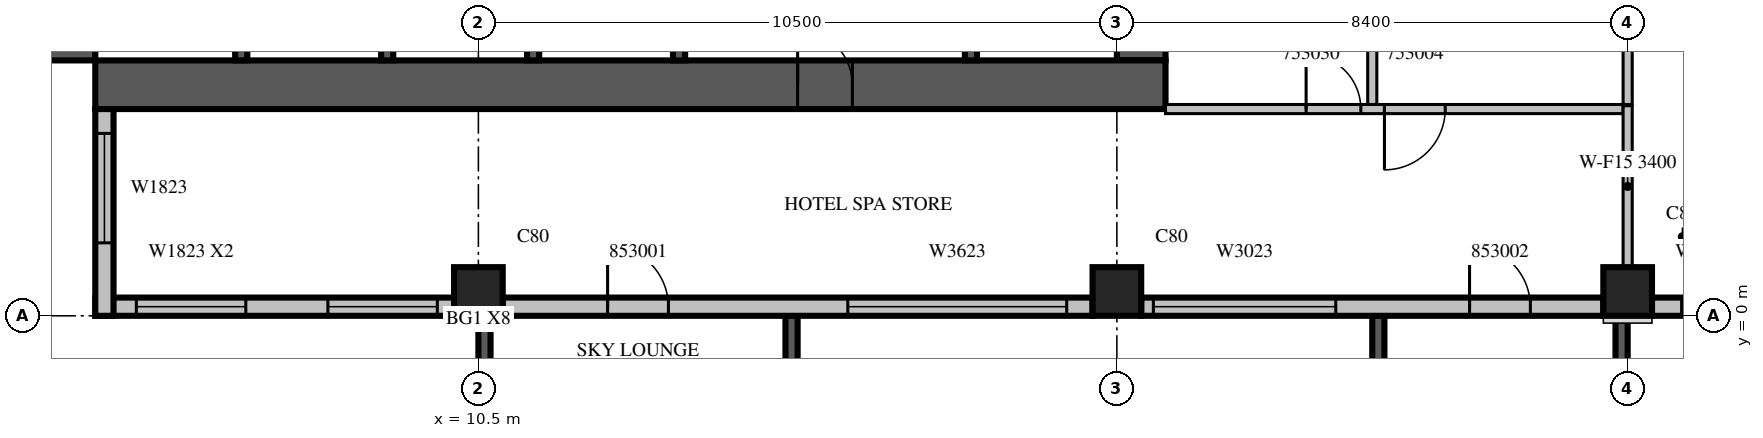
"""IFC4 building model, lengths in metres.
Left out: names, types, materials, properties, quantities, classifications, styles, units other than length and angle.
Written with IfcOpenShell. Run it as: python <this file> out.ifc"""

import sys

from ifc_helpers import new_model, si_unit, direction, frame, frame_2d, origin, origin_2d, place, context, subcontext, project, spatial, rectangle, extrude, source, transform, mapped, element, fill, save


model = new_model("IFC4")
c1 = context("Model", 3, precision=1e-05, world=origin(), true_north=direction((0.0, 1.0)))
c2 = subcontext(c1, "Body", "Model", "MODEL_VIEW")
j1 = project(units=[si_unit("LENGTHUNIT", "METRE"), si_unit("PLANEANGLEUNIT", "RADIAN")], contexts=[c1])
p1 = place(None, origin())
s1 = spatial("IfcSite", under=j1, at=p1, CompositionType="ELEMENT")
p2 = place(p1, origin())
s2 = spatial("IfcBuilding", under=s1, at=p2, CompositionType="ELEMENT")
p3 = place(p2, frame((0.0, 0.0, 234.8)))
s3 = spatial("IfcBuildingStorey", under=s2, at=p3, CompositionType="ELEMENT", Elevation=234.8)
m1 = source(origin(), c2, "Body", "SweptSolid", [
    extrude(rectangle(XDim=0.8, YDim=0.8, at=origin_2d()), origin(), (0.0, 0.0, 1.0), 3.8),
])
for number, where, z_axis, x_axis in (
    (1, (10.5, 0.4, 0.0), (0.0, 0.0, 1.0), (1.0, 0.0, 0.0)),
    (2, (21.0, 0.4, 0.0), (0.0, 0.0, 1.0), (1.0, 0.0, 0.0)),
    (3, (29.4, 0.4, 0.0), (0.0, 0.0, 1.0), (1.0, 0.0, 0.0)),
):
    element("IfcColumn", number, at=place(p3, frame(where, z_axis=z_axis, x_axis=x_axis)), inside=s3, PredefinedType="COLUMN", context=c2, shape_type="MappedRepresentation", body=[
        mapped(m1, transform((0.0, 0.0, 0.0), scale=1.0)),
    ])
m2 = source(origin(), c2, "Body", "SweptSolid", [
    extrude(rectangle(XDim=17.6, YDim=0.8, at=frame_2d((8.8, 0.0))), origin(), (0.0, 0.0, 1.0), 3.8),
])
p4 = place(p3, frame((3.8, 4.2, 0.0), z_axis=(0.0, 0.0, 1.0), x_axis=(0.0, 1.0, 0.0)))
e4 = element("IfcWall", 4, at=p4, inside=s3, PredefinedType="SHEAR", context=c2, shape_type="MappedRepresentation", body=[
    mapped(m2, transform((0.0, 0.0, 0.0), scale=1.0)),
])
m3 = source(origin(), c2, "Body", "SweptSolid", [
    extrude(rectangle(XDim=2.2, YDim=2.1, at=frame_2d((1.1, 1.05))), frame((0.0, 0.41, 0.0), z_axis=(0.0, -1.0, 0.0), x_axis=(1.0, 0.0, 0.0)), (0.0, 0.0, 1.0), 0.82),
])
p5 = place(p4, frame((4.2, 0.0, 0.0)))
e5 = element("IfcOpeningElement", 5, at=p5, cuts=e4, PredefinedType="OPENING", context=c2, shape_type="MappedRepresentation", body=[
    mapped(m3, transform((0.0, 0.0, 0.0), scale=1.0)),
])
m4 = source(origin(), c2, "Body", "SweptSolid", [
    extrude(rectangle(XDim=0.9, YDim=2.1, at=frame_2d((0.45, 1.05))), frame((0.0, 0.41, 0.0), z_axis=(0.0, -1.0, 0.0), x_axis=(1.0, 0.0, 0.0)), (0.0, 0.0, 1.0), 0.82),
])
p6 = place(p4, frame((10.95, 0.0, 0.0)))
e6 = element("IfcOpeningElement", 6, at=p6, cuts=e4, PredefinedType="OPENING", context=c2, shape_type="MappedRepresentation", body=[
    mapped(m4, transform((0.0, 0.0, 0.0), scale=1.0)),
])
m5 = source(origin(), c2, "Body", "SweptSolid", [
    extrude(rectangle(XDim=16.8, YDim=0.8, at=frame_2d((8.4, 0.0))), origin(), (0.0, 0.0, 1.0), 3.8),
])
p7 = place(p3, frame((21.4, 4.2, 0.0), z_axis=(0.0, 0.0, 1.0), x_axis=(0.0, 1.0, 0.0)))
e7 = element("IfcWall", 7, at=p7, inside=s3, PredefinedType="SHEAR", context=c2, shape_type="MappedRepresentation", body=[
    mapped(m5, transform((0.0, 0.0, 0.0), scale=1.0)),
])
p8 = place(p7, frame((4.2, 0.0, 0.0)))
e8 = element("IfcOpeningElement", 8, at=p8, cuts=e7, PredefinedType="OPENING", context=c2, shape_type="MappedRepresentation", body=[
    mapped(m3, transform((0.0, 0.0, 0.0), scale=1.0)),
])
m6 = source(origin(), c2, "Body", "SweptSolid", [
    extrude(rectangle(XDim=1.2, YDim=2.1, at=frame_2d((0.6, 1.05))), frame((0.0, 0.41, 0.0), z_axis=(0.0, -1.0, 0.0), x_axis=(1.0, 0.0, 0.0)), (0.0, 0.0, 1.0), 0.82),
])
p9 = place(p7, frame((14.7, 0.0, 0.0)))
e9 = element("IfcOpeningElement", 9, at=p9, cuts=e7, PredefinedType="OPENING", context=c2, shape_type="MappedRepresentation", body=[
    mapped(m6, transform((0.0, 0.0, 0.0), scale=1.0)),
])
p10 = place(p3, frame((4.2, 3.8, 0.0), z_axis=(0.0, 0.0, 1.0), x_axis=(1.0, 0.0, 0.0)))
e10 = element("IfcWall", 10, at=p10, inside=s3, PredefinedType="SHEAR", context=c2, shape_type="MappedRepresentation", body=[
    mapped(m2, transform((0.0, 0.0, 0.0), scale=1.0)),
])
p11 = place(p10, frame((11.55, 0.0, 0.0)))
e11 = element("IfcOpeningElement", 11, at=p11, cuts=e10, PredefinedType="OPENING", context=c2, shape_type="MappedRepresentation", body=[
    mapped(m4, transform((0.0, 0.0, 0.0), scale=1.0)),
])
m7 = source(origin(), c2, "Body", "SweptSolid", [
    extrude(rectangle(XDim=3.9, YDim=0.2, at=frame_2d((1.95, 0.0))), origin(), (0.0, 0.0, 1.0), 3.4),
])
p12 = place(p3, frame((10.6, 0.0, 0.0), z_axis=(0.0, 0.0, 1.0), x_axis=(0.0, -1.0, 0.0)))
e12 = element("IfcWall", 12, at=p12, inside=s3, PredefinedType="SOLIDWALL", context=c2, shape_type="MappedRepresentation", body=[
    mapped(m7, transform((0.0, 0.0, 0.0), scale=1.0)),
])
m8 = source(origin(), c2, "Body", "SweptSolid", [
    extrude(rectangle(XDim=2.4, YDim=2.3, at=frame_2d((1.2, 1.15))), frame((0.0, 0.11, 0.0), z_axis=(0.0, -1.0, 0.0), x_axis=(1.0, 0.0, 0.0)), (0.0, 0.0, 1.0), 0.22),
])
p13 = place(p12, frame((0.75, 0.0, 0.6)))
e13 = element("IfcOpeningElement", 13, at=p13, cuts=e12, PredefinedType="OPENING", context=c2, shape_type="MappedRepresentation", body=[
    mapped(m8, transform((0.0, 0.0, 0.0), scale=1.0)),
])
p14 = place(p3, frame((15.65, 0.0, 0.0), z_axis=(0.0, 0.0, 1.0), x_axis=(0.0, -1.0, 0.0)))
e14 = element("IfcWall", 14, at=p14, inside=s3, PredefinedType="SOLIDWALL", context=c2, shape_type="MappedRepresentation", body=[
    mapped(m7, transform((0.0, 0.0, 0.0), scale=1.0)),
])
p15 = place(p14, frame((0.75, 0.0, 0.6)))
e15 = element("IfcOpeningElement", 15, at=p15, cuts=e14, PredefinedType="OPENING", context=c2, shape_type="MappedRepresentation", body=[
    mapped(m8, transform((0.0, 0.0, 0.0), scale=1.0)),
])
p16 = place(p3, frame((25.3, 0.0, 0.0), z_axis=(0.0, 0.0, 1.0), x_axis=(0.0, -1.0, 0.0)))
e16 = element("IfcWall", 16, at=p16, inside=s3, PredefinedType="SOLIDWALL", context=c2, shape_type="MappedRepresentation", body=[
    mapped(m7, transform((0.0, 0.0, 0.0), scale=1.0)),
])
p17 = place(p16, frame((0.75, 0.0, 0.6)))
e17 = element("IfcOpeningElement", 17, at=p17, cuts=e16, PredefinedType="OPENING", context=c2, shape_type="MappedRepresentation", body=[
    mapped(m8, transform((0.0, 0.0, 0.0), scale=1.0)),
])
p18 = place(p3, frame((29.3, 0.0, 0.0), z_axis=(0.0, 0.0, 1.0), x_axis=(0.0, -1.0, 0.0)))
e18 = element("IfcWall", 18, at=p18, inside=s3, PredefinedType="SOLIDWALL", context=c2, shape_type="MappedRepresentation", body=[
    mapped(m7, transform((0.0, 0.0, 0.0), scale=1.0)),
])
p19 = place(p18, frame((0.75, 0.0, 0.6)))
e19 = element("IfcOpeningElement", 19, at=p19, cuts=e18, PredefinedType="OPENING", context=c2, shape_type="MappedRepresentation", body=[
    mapped(m8, transform((0.0, 0.0, 0.0), scale=1.0)),
])
m9 = source(origin(), c2, "Body", "SweptSolid", [
    extrude(rectangle(XDim=5.9, YDim=0.3, at=frame_2d((2.95, 0.0))), origin(), (0.0, 0.0, 1.0), 3.4),
])
p20 = place(p3, frame((4.2, 0.15, 0.0), z_axis=(0.0, 0.0, 1.0), x_axis=(1.0, 0.0, 0.0)))
e20 = element("IfcWall", 20, at=p20, inside=s3, PredefinedType="STANDARD", context=c2, shape_type="MappedRepresentation", body=[
    mapped(m9, transform((0.0, 0.0, 0.0), scale=1.0)),
])
m10 = source(origin(), c2, "Body", "SweptSolid", [
    extrude(rectangle(XDim=1.8, YDim=2.3, at=frame_2d((0.9, 1.15))), frame((0.0, 0.16, 0.0), z_axis=(0.0, -1.0, 0.0), x_axis=(1.0, 0.0, 0.0)), (0.0, 0.0, 1.0), 0.32),
])
p21 = place(p20, frame((0.675, 0.0, 0.6)))
e21 = element("IfcOpeningElement", 21, at=p21, cuts=e20, PredefinedType="OPENING", context=c2, shape_type="MappedRepresentation", body=[
    mapped(m10, transform((0.0, 0.0, 0.0), scale=1.0)),
])
p22 = place(p20, frame((3.825, 0.0, 0.6)))
e22 = element("IfcOpeningElement", 22, at=p22, cuts=e20, PredefinedType="OPENING", context=c2, shape_type="MappedRepresentation", body=[
    mapped(m10, transform((0.0, 0.0, 0.0), scale=1.0)),
])
m11 = source(origin(), c2, "Body", "SweptSolid", [
    extrude(rectangle(XDim=9.7, YDim=0.3, at=frame_2d((4.85, 0.0))), origin(), (0.0, 0.0, 1.0), 3.4),
])
p23 = place(p3, frame((10.9, 0.15, 0.0), z_axis=(0.0, 0.0, 1.0), x_axis=(1.0, 0.0, 0.0)))
e23 = element("IfcWall", 23, at=p23, inside=s3, PredefinedType="STANDARD", context=c2, shape_type="MappedRepresentation", body=[
    mapped(m11, transform((0.0, 0.0, 0.0), scale=1.0)),
])
m12 = source(origin(), c2, "Body", "SweptSolid", [
    extrude(rectangle(XDim=3.6, YDim=2.3, at=frame_2d((1.8, 1.15))), frame((0.0, 0.16, 0.0), z_axis=(0.0, -1.0, 0.0), x_axis=(1.0, 0.0, 0.0)), (0.0, 0.0, 1.0), 0.32),
])
p24 = place(p23, frame((5.675, 0.0, 0.6)))
e24 = element("IfcOpeningElement", 24, at=p24, cuts=e23, PredefinedType="OPENING", context=c2, shape_type="MappedRepresentation", body=[
    mapped(m12, transform((0.0, 0.0, 0.0), scale=1.0)),
])
m13 = source(origin(), c2, "Body", "SweptSolid", [
    extrude(rectangle(XDim=1.0, YDim=2.1, at=frame_2d((0.5, 1.05))), frame((0.0, 0.16, 0.0), z_axis=(0.0, -1.0, 0.0), x_axis=(1.0, 0.0, 0.0)), (0.0, 0.0, 1.0), 0.32),
])
p25 = place(p23, frame((1.725, 0.0, 0.0)))
e25 = element("IfcOpeningElement", 25, at=p25, cuts=e23, PredefinedType="OPENING", context=c2, shape_type="MappedRepresentation", body=[
    mapped(m13, transform((0.0, 0.0, 0.0), scale=1.0)),
])
m14 = source(origin(), c2, "Body", "SweptSolid", [
    extrude(rectangle(XDim=7.6, YDim=0.3, at=frame_2d((3.8, 0.0))), origin(), (0.0, 0.0, 1.0), 3.4),
])
p26 = place(p3, frame((21.4, 0.15, 0.0), z_axis=(0.0, 0.0, 1.0), x_axis=(1.0, 0.0, 0.0)))
e26 = element("IfcWall", 26, at=p26, inside=s3, PredefinedType="STANDARD", context=c2, shape_type="MappedRepresentation", body=[
    mapped(m14, transform((0.0, 0.0, 0.0), scale=1.0)),
])
m15 = source(origin(), c2, "Body", "SweptSolid", [
    extrude(rectangle(XDim=3.0, YDim=2.3, at=frame_2d((1.5, 1.15))), frame((0.0, 0.16, 0.0), z_axis=(0.0, -1.0, 0.0), x_axis=(1.0, 0.0, 0.0)), (0.0, 0.0, 1.0), 0.32),
])
p27 = place(p26, frame((0.2, 0.0, 0.6)))
e27 = element("IfcOpeningElement", 27, at=p27, cuts=e26, PredefinedType="OPENING", context=c2, shape_type="MappedRepresentation", body=[
    mapped(m15, transform((0.0, 0.0, 0.0), scale=1.0)),
])
p28 = place(p26, frame((5.4, 0.0, 0.0)))
e28 = element("IfcOpeningElement", 28, at=p28, cuts=e26, PredefinedType="OPENING", context=c2, shape_type="MappedRepresentation", body=[
    mapped(m13, transform((0.0, 0.0, 0.0), scale=1.0)),
])
p29 = place(p3, frame((29.8, 0.15, 0.0), z_axis=(0.0, 0.0, 1.0), x_axis=(1.0, 0.0, 0.0)))
e29 = element("IfcWall", 29, at=p29, inside=s3, PredefinedType="STANDARD", context=c2, shape_type="MappedRepresentation", body=[
    mapped(m14, transform((0.0, 0.0, 0.0), scale=1.0)),
])
m16 = source(origin(), c2, "Body", "SweptSolid", [
    extrude(rectangle(XDim=1.2, YDim=2.3, at=frame_2d((0.6, 1.15))), frame((0.0, 0.16, 0.0), z_axis=(0.0, -1.0, 0.0), x_axis=(1.0, 0.0, 0.0)), (0.0, 0.0, 1.0), 0.32),
])
p30 = place(p29, frame((0.487, 0.0, 0.6)))
e30 = element("IfcOpeningElement", 30, at=p30, cuts=e29, PredefinedType="OPENING", context=c2, shape_type="MappedRepresentation", body=[
    mapped(m16, transform((0.0, 0.0, 0.0), scale=1.0)),
])
p31 = place(p29, frame((6.013, 0.0, 0.6)))
e31 = element("IfcOpeningElement", 31, at=p31, cuts=e29, PredefinedType="OPENING", context=c2, shape_type="MappedRepresentation", body=[
    mapped(m16, transform((0.0, 0.0, 0.0), scale=1.0)),
])
m17 = source(origin(), c2, "Body", "SweptSolid", [
    extrude(rectangle(XDim=2.4, YDim=2.3, at=frame_2d((1.2, 1.15))), frame((0.0, 0.16, 0.0), z_axis=(0.0, -1.0, 0.0), x_axis=(1.0, 0.0, 0.0)), (0.0, 0.0, 1.0), 0.32),
])
p32 = place(p29, frame((2.65, 0.0, 0.6)))
e32 = element("IfcOpeningElement", 32, at=p32, cuts=e29, PredefinedType="OPENING", context=c2, shape_type="MappedRepresentation", body=[
    mapped(m17, transform((0.0, 0.0, 0.0), scale=1.0)),
])
m18 = source(origin(), c2, "Body", "SweptSolid", [
    extrude(rectangle(XDim=3.4, YDim=0.3, at=frame_2d((1.7, 0.0))), origin(), (0.0, 0.0, 1.0), 3.4),
])
p33 = place(p3, frame((4.35, 3.4, 0.0), z_axis=(0.0, 0.0, 1.0), x_axis=(0.0, -1.0, 0.0)))
e33 = element("IfcWall", 33, at=p33, inside=s3, PredefinedType="STANDARD", context=c2, shape_type="MappedRepresentation", body=[
    mapped(m18, transform((0.0, 0.0, 0.0), scale=1.0)),
])
p34 = place(p33, frame((0.4, 0.0, 0.6)))
e34 = element("IfcOpeningElement", 34, at=p34, cuts=e33, PredefinedType="OPENING", context=c2, shape_type="MappedRepresentation", body=[
    mapped(m10, transform((0.0, 0.0, 0.0), scale=1.0)),
])
m19 = source(origin(), c2, "Body", "SweptSolid", [
    extrude(rectangle(XDim=3.1, YDim=0.2, at=frame_2d((1.55, 0.0))), origin(), (0.0, 0.0, 1.0), 3.8),
])
for number, where, z_axis, x_axis in (
    (35, (6.6, 4.2, 0.0), (0.0, 0.0, 1.0), (0.0, 1.0, 0.0)),
    (36, (9.0, 4.2, 0.0), (0.0, 0.0, 1.0), (0.0, 1.0, 0.0)),
    (37, (11.4, 4.2, 0.0), (0.0, 0.0, 1.0), (0.0, 1.0, 0.0)),
):
    element("IfcWall", number, at=place(p3, frame(where, z_axis=z_axis, x_axis=x_axis)), inside=s3, PredefinedType="SOLIDWALL", context=c2, shape_type="MappedRepresentation", body=[
        mapped(m19, transform((0.0, 0.0, 0.0), scale=1.0)),
    ])
m20 = source(origin(), c2, "Body", "SweptSolid", [
    extrude(rectangle(XDim=3.1, YDim=0.2, at=frame_2d((1.55, 0.0))), origin(), (0.0, 0.0, 1.0), 3.4),
])
for number, where, z_axis, x_axis in (
    (38, (13.8, 4.2, 0.0), (0.0, 0.0, 1.0), (0.0, 1.0, 0.0)),
    (39, (18.6, 4.2, 0.0), (0.0, 0.0, 1.0), (0.0, 1.0, 0.0)),
):
    element("IfcWall", number, at=place(p3, frame(where, z_axis=z_axis, x_axis=x_axis)), inside=s3, PredefinedType="SOLIDWALL", context=c2, shape_type="MappedRepresentation", body=[
        mapped(m20, transform((0.0, 0.0, 0.0), scale=1.0)),
    ])
m21 = source(origin(), c2, "Body", "SweptSolid", [
    extrude(rectangle(XDim=11.525, YDim=0.15, at=frame_2d((5.763, 0.0))), origin(), (0.0, 0.0, 1.0), 3.4),
])
p35 = place(p3, frame((25.2, 15.0, 0.0), z_axis=(0.0, 0.0, 1.0), x_axis=(0.0, -1.0, 0.0)))
e40 = element("IfcWall", 40, at=p35, inside=s3, PredefinedType="PARTITIONING", context=c2, shape_type="MappedRepresentation", body=[
    mapped(m21, transform((0.0, 0.0, 0.0), scale=1.0)),
])
m22 = source(origin(), c2, "Body", "SweptSolid", [
    extrude(rectangle(XDim=0.9, YDim=2.1, at=frame_2d((0.45, 1.05))), frame((0.0, 0.085, 0.0), z_axis=(0.0, -1.0, 0.0), x_axis=(1.0, 0.0, 0.0)), (0.0, 0.0, 1.0), 0.17),
])
p36 = place(p35, frame((8.762, 0.0, 0.0)))
e41 = element("IfcOpeningElement", 41, at=p36, cuts=e40, PredefinedType="OPENING", context=c2, shape_type="MappedRepresentation", body=[
    mapped(m22, transform((0.0, 0.0, 0.0), scale=1.0)),
])
p37 = place(p35, frame((2.125, 0.0, 0.0)))
e42 = element("IfcOpeningElement", 42, at=p37, cuts=e40, PredefinedType="OPENING", context=c2, shape_type="MappedRepresentation", body=[
    mapped(m22, transform((0.0, 0.0, 0.0), scale=1.0)),
])
m23 = source(origin(), c2, "Body", "SweptSolid", [
    extrude(rectangle(XDim=6.626, YDim=0.15, at=frame_2d((3.313, 0.0))), origin(), (0.0, 0.0, 1.0), 3.4),
])
p38 = place(p3, frame((29.4, 3.475, 0.0), z_axis=(0.0, 0.0, 1.0), x_axis=(0.0, 1.0, 0.0)))
e43 = element("IfcWall", 43, at=p38, inside=s3, PredefinedType="PARTITIONING", context=c2, shape_type="MappedRepresentation", body=[
    mapped(m23, transform((0.0, 0.0, 0.0), scale=1.0)),
])
m24 = source(origin(), c2, "Body", "SweptSolid", [
    extrude(rectangle(XDim=7.525, YDim=0.15, at=frame_2d((3.763, 0.0))), origin(), (0.0, 0.0, 1.0), 3.4),
])
p39 = place(p3, frame((21.8, 3.4, 0.0), z_axis=(0.0, 0.0, 1.0), x_axis=(1.0, 0.0, 0.0)))
e44 = element("IfcWall", 44, at=p39, inside=s3, PredefinedType="PARTITIONING", context=c2, shape_type="MappedRepresentation", body=[
    mapped(m24, transform((0.0, 0.0, 0.0), scale=1.0)),
])
m25 = source(origin(), c2, "Body", "SweptSolid", [
    extrude(rectangle(XDim=1.0, YDim=2.1, at=frame_2d((0.5, 1.05))), frame((0.0, 0.085, 0.0), z_axis=(0.0, -1.0, 0.0), x_axis=(1.0, 0.0, 0.0)), (0.0, 0.0, 1.0), 0.17),
])
p40 = place(p39, frame((3.6, 0.0, 0.0)))
e45 = element("IfcOpeningElement", 45, at=p40, cuts=e44, PredefinedType="OPENING", context=c2, shape_type="MappedRepresentation", body=[
    mapped(m25, transform((0.0, 0.0, 0.0), scale=1.0)),
])
p41 = place(p39, frame((2.312, 0.0, 0.0)))
e46 = element("IfcOpeningElement", 46, at=p41, cuts=e44, PredefinedType="OPENING", context=c2, shape_type="MappedRepresentation", body=[
    mapped(m22, transform((0.0, 0.0, 0.0), scale=1.0)),
])
m26 = source(origin(), c2, "Body", "SweptSolid", [
    extrude(rectangle(XDim=2.656, YDim=0.15, at=frame_2d((1.328, 0.0))), origin(), (0.0, 0.0, 1.0), 3.4),
])
p42 = place(p3, frame((29.4, 0.799, 0.0), z_axis=(0.0, 0.0, 1.0), x_axis=(0.0, 1.0, 0.0)))
e47 = element("IfcWall", 47, at=p42, inside=s3, PredefinedType="PARTITIONING", context=c2, shape_type="MappedRepresentation", body=[
    mapped(m26, transform((0.0, 0.0, 0.0), scale=1.0)),
])
m27 = source(origin(), c2, "Body", "SweptSolid", [
    extrude(rectangle(XDim=1.8, YDim=2.3, at=frame_2d((0.9, 1.15))), frame((0.0, 0.03, 0.0), z_axis=(0.0, -1.0, 0.0), x_axis=(1.0, 0.0, 0.0)), (0.0, 0.0, 1.0), 0.06),
])
p43 = place(p21, origin())
e48 = element("IfcWindow", 48, at=p43, inside=s3, PartitioningType="SINGLE_PANEL", PredefinedType="WINDOW", context=c2, shape_type="MappedRepresentation", body=[
    mapped(m27, transform((0.0, 0.0, 0.0), scale=1.0)),
])
fill(e21, e48)
p44 = place(p22, origin())
e49 = element("IfcWindow", 49, at=p44, inside=s3, PartitioningType="SINGLE_PANEL", PredefinedType="WINDOW", context=c2, shape_type="MappedRepresentation", body=[
    mapped(m27, transform((0.0, 0.0, 0.0), scale=1.0)),
])
fill(e22, e49)
m28 = source(origin(), c2, "Body", "SweptSolid", [
    extrude(rectangle(XDim=3.6, YDim=2.3, at=frame_2d((1.8, 1.15))), frame((0.0, 0.03, 0.0), z_axis=(0.0, -1.0, 0.0), x_axis=(1.0, 0.0, 0.0)), (0.0, 0.0, 1.0), 0.06),
])
p45 = place(p24, origin())
e50 = element("IfcWindow", 50, at=p45, inside=s3, PartitioningType="SINGLE_PANEL", PredefinedType="WINDOW", context=c2, shape_type="MappedRepresentation", body=[
    mapped(m28, transform((0.0, 0.0, 0.0), scale=1.0)),
])
fill(e24, e50)
m29 = source(origin(), c2, "Body", "SweptSolid", [
    extrude(rectangle(XDim=3.0, YDim=2.3, at=frame_2d((1.5, 1.15))), frame((0.0, 0.03, 0.0), z_axis=(0.0, -1.0, 0.0), x_axis=(1.0, 0.0, 0.0)), (0.0, 0.0, 1.0), 0.06),
])
p46 = place(p27, origin())
e51 = element("IfcWindow", 51, at=p46, inside=s3, PartitioningType="SINGLE_PANEL", PredefinedType="WINDOW", context=c2, shape_type="MappedRepresentation", body=[
    mapped(m29, transform((0.0, 0.0, 0.0), scale=1.0)),
])
fill(e27, e51)
m30 = source(origin(), c2, "Body", "SweptSolid", [
    extrude(rectangle(XDim=1.2, YDim=2.3, at=frame_2d((0.6, 1.15))), frame((0.0, 0.03, 0.0), z_axis=(0.0, -1.0, 0.0), x_axis=(1.0, 0.0, 0.0)), (0.0, 0.0, 1.0), 0.06),
])
p47 = place(p30, origin())
e52 = element("IfcWindow", 52, at=p47, inside=s3, PartitioningType="SINGLE_PANEL", PredefinedType="WINDOW", context=c2, shape_type="MappedRepresentation", body=[
    mapped(m30, transform((0.0, 0.0, 0.0), scale=1.0)),
])
fill(e30, e52)
p48 = place(p34, origin())
e53 = element("IfcWindow", 53, at=p48, inside=s3, PartitioningType="SINGLE_PANEL", PredefinedType="WINDOW", context=c2, shape_type="MappedRepresentation", body=[
    mapped(m27, transform((0.0, 0.0, 0.0), scale=1.0)),
])
fill(e34, e53)
m31 = source(origin(), c2, "Body", "SweptSolid", [
    extrude(rectangle(XDim=0.9, YDim=2.1, at=frame_2d((0.45, 1.05))), frame((0.0, 0.025, 0.0), z_axis=(0.0, -1.0, 0.0), x_axis=(1.0, 0.0, 0.0)), (0.0, 0.0, 1.0), 0.05),
])
p49 = place(p11, origin())
e54 = element("IfcDoor", 54, at=p49, inside=s3, OperationType="SINGLE_SWING_LEFT", PredefinedType="DOOR", context=c2, shape_type="MappedRepresentation", body=[
    mapped(m31, transform((0.0, 0.0, 0.0), scale=1.0)),
])
fill(e11, e54)
m32 = source(origin(), c2, "Body", "SweptSolid", [
    extrude(rectangle(XDim=1.0, YDim=2.1, at=frame_2d((0.5, 1.05))), frame((0.0, 0.025, 0.0), z_axis=(0.0, -1.0, 0.0), x_axis=(1.0, 0.0, 0.0)), (0.0, 0.0, 1.0), 0.05),
])
p50 = place(p40, origin())
e55 = element("IfcDoor", 55, at=p50, inside=s3, OperationType="SINGLE_SWING_RIGHT", PredefinedType="DOOR", context=c2, shape_type="MappedRepresentation", body=[
    mapped(m32, transform((0.0, 0.0, 0.0), scale=1.0)),
])
fill(e45, e55)
p51 = place(p41, origin())
e56 = element("IfcDoor", 56, at=p51, inside=s3, OperationType="SINGLE_SWING_LEFT", PredefinedType="DOOR", context=c2, shape_type="MappedRepresentation", body=[
    mapped(m31, transform((0.0, 0.0, 0.0), scale=1.0)),
])
fill(e46, e56)
p52 = place(p25, origin())
e57 = element("IfcDoor", 57, at=p52, inside=s3, OperationType="SINGLE_SWING_LEFT", PredefinedType="DOOR", context=c2, shape_type="MappedRepresentation", body=[
    mapped(m32, transform((0.0, 0.0, 0.0), scale=1.0)),
])
fill(e25, e57)
p53 = place(p28, origin())
e58 = element("IfcDoor", 58, at=p53, inside=s3, OperationType="SINGLE_SWING_LEFT", PredefinedType="DOOR", context=c2, shape_type="MappedRepresentation", body=[
    mapped(m32, transform((0.0, 0.0, 0.0), scale=1.0)),
])
fill(e28, e58)
save(model, sys.argv[1])
